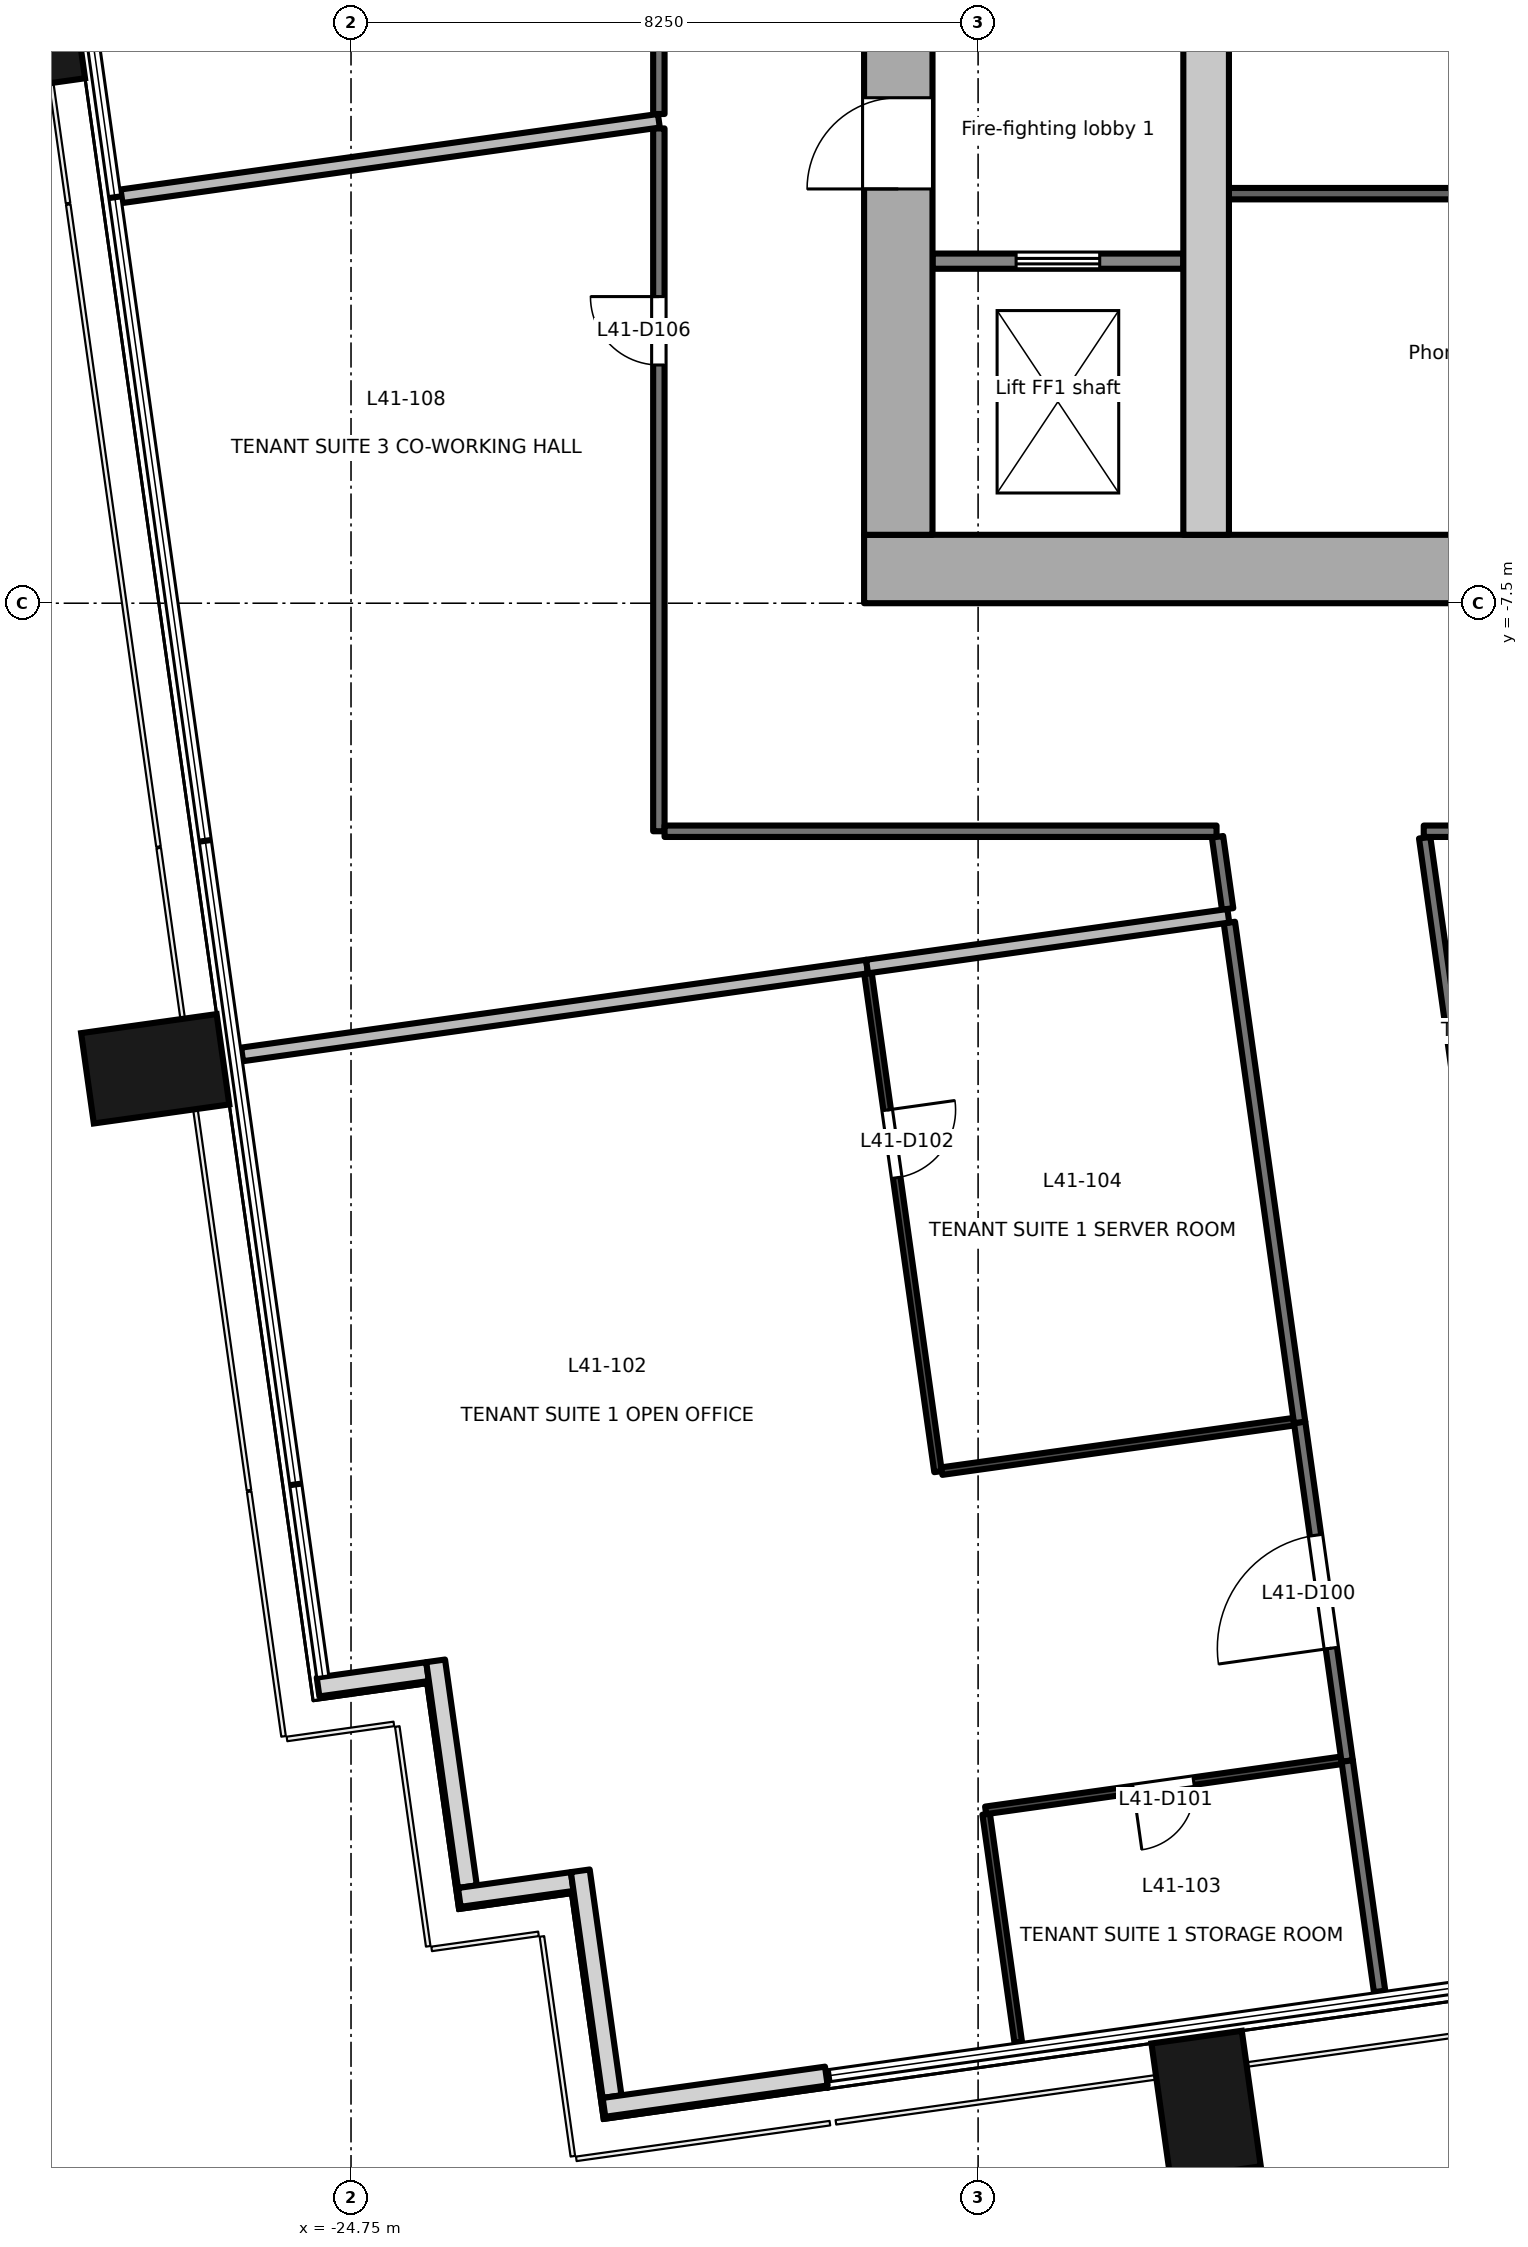
"""IFC4 building model, lengths in metres.
Left out: names, types, materials, properties, quantities, classifications, styles, units other than length and angle.
Written with IfcOpenShell. Run it as: python <this file> out.ifc"""

import sys

from ifc_helpers import new_model, si_unit, direction, frame, frame_2d, origin, origin_2d, place, context, subcontext, project, spatial, rectangle, extrude, element, fill, save


model = new_model("IFC4")
c1 = context("Model", 3, precision=1e-05, world=origin(), true_north=direction((0.0, 1.0)))
c2 = subcontext(c1, "Body", "Model", "MODEL_VIEW")
j1 = project(units=[si_unit("LENGTHUNIT", "METRE"), si_unit("PLANEANGLEUNIT", "RADIAN")], contexts=[c1])
p1 = place(None, origin())
s1 = spatial("IfcSite", under=j1, at=p1, CompositionType="ELEMENT")
p2 = place(p1, origin())
s2 = spatial("IfcBuilding", under=s1, at=p2, CompositionType="ELEMENT")
p3 = place(p2, frame((0.0, 0.0, 180.2)))
s3 = spatial("IfcBuildingStorey", under=s2, at=p3, CompositionType="ELEMENT", Elevation=180.2)
for number, where, z_axis, x_axis in (
    (1, (-13.5, -27.256, -0.2), (0.0, 0.0, 1.0), (0.99, 0.139, 0.0)),
    (2, (-27.326, -13.625, -0.2), (0.0, 0.0, 1.0), (-0.139, 0.99, 0.0)),
    (3, (-29.224, -0.125, -0.2), (0.0, 0.0, 1.0), (-0.139, 0.99, 0.0)),
):
    element("IfcColumn", number, at=place(p3, frame(where, z_axis=z_axis, x_axis=x_axis)), inside=s3, PredefinedType="COLUMN", context=c2, shape_type="SweptSolid", body=[
        extrude(rectangle(XDim=1.2, YDim=1.8, at=origin_2d()), origin(), (0.0, 0.0, 1.0), 3.9),
    ])
p4 = place(p3, frame((-25.184, -21.758, 0.0), z_axis=(0.0, 0.0, 1.0), x_axis=(0.9902493448, 0.13930626376, 0.0)))
e4 = element("IfcWall", 4, at=p4, inside=s3, PredefinedType="SOLIDWALL", context=c2, shape_type="SweptSolid", body=[
    extrude(rectangle(XDim=1.455, YDim=0.25, at=frame_2d((0.727, 0.0))), origin(), (0.0, 0.0, 1.0), 3.7),
])
p5 = place(p3, frame((-23.637, -21.414, 0.0), z_axis=(0.0, 0.0, 1.0), x_axis=(0.139313431826, -0.990248336385, 0.0)))
e5 = element("IfcWall", 5, at=p5, inside=s3, PredefinedType="SOLIDWALL", context=c2, shape_type="SweptSolid", body=[
    extrude(rectangle(XDim=3.0, YDim=0.25, at=frame_2d((1.5, 0.0))), origin(), (0.0, 0.0, 1.0), 3.7),
])
p6 = place(p3, frame((-23.325, -24.526, 0.0), z_axis=(0.0, 0.0, 1.0), x_axis=(0.990243596651, 0.13934711799, 0.0)))
e6 = element("IfcWall", 6, at=p6, inside=s3, PredefinedType="SOLIDWALL", context=c2, shape_type="SweptSolid", body=[
    extrude(rectangle(XDim=1.5, YDim=0.25, at=frame_2d((0.75, 0.0))), origin(), (0.0, 0.0, 1.0), 3.7),
])
p7 = place(p3, frame((-21.734, -24.176, 0.0), z_axis=(0.0, 0.0, 1.0), x_axis=(0.139313431826, -0.990248336385, 0.0)))
e7 = element("IfcWall", 7, at=p7, inside=s3, PredefinedType="SOLIDWALL", context=c2, shape_type="SweptSolid", body=[
    extrude(rectangle(XDim=3.0, YDim=0.25, at=frame_2d((1.5, 0.0))), origin(), (0.0, 0.0, 1.0), 3.7),
])
p8 = place(p3, frame((-21.422, -27.288, 0.0), z_axis=(0.0, 0.0, 1.0), x_axis=(0.990246427036, 0.139327002919, 0.0)))
e8 = element("IfcWall", 8, at=p8, inside=s3, PredefinedType="SOLIDWALL", context=c2, shape_type="SweptSolid", body=[
    extrude(rectangle(XDim=2.954, YDim=0.25, at=frame_2d((1.477, 0.0))), origin(), (0.0, 0.0, 1.0), 3.7),
])
p9 = place(p3, frame((-18.0, -7.05, -0.2), z_axis=(0.0, 0.0, 1.0), x_axis=(1.0, 0.0, 0.0)))
e9 = element("IfcWall", 9, at=p9, inside=s3, PredefinedType="SHEAR", context=c2, shape_type="SweptSolid", body=[
    extrude(rectangle(XDim=36.0, YDim=0.9, at=frame_2d((18.0, 0.0))), origin(), (0.0, 0.0, 1.0), 3.9),
])
p10 = place(p9, frame((11.3, 0.0, 0.2)))
e10 = element("IfcOpeningElement", 10, at=p10, cuts=e9, PredefinedType="OPENING", context=c2, shape_type="SweptSolid", body=[
    extrude(rectangle(XDim=1.8, YDim=2.1, at=frame_2d((0.9, 1.05))), frame((0.0, 0.46, 0.0), z_axis=(0.0, -1.0, 0.0), x_axis=(1.0, 0.0, 0.0)), (0.0, 0.0, 1.0), 0.921),
])
p11 = place(p9, frame((16.8, 0.0, 0.2)))
e11 = element("IfcOpeningElement", 11, at=p11, cuts=e9, PredefinedType="OPENING", context=c2, shape_type="SweptSolid", body=[
    extrude(rectangle(XDim=2.4, YDim=2.1, at=frame_2d((1.2, 1.05))), frame((0.0, 0.46, 0.0), z_axis=(0.0, -1.0, 0.0), x_axis=(1.0, 0.0, 0.0)), (0.0, 0.0, 1.0), 0.921),
])
p12 = place(p9, frame((26.1, 0.0, 0.2)))
e12 = element("IfcOpeningElement", 12, at=p12, cuts=e9, PredefinedType="OPENING", context=c2, shape_type="SweptSolid", body=[
    extrude(rectangle(XDim=2.4, YDim=2.1, at=frame_2d((1.2, 1.05))), frame((0.0, 0.46, 0.0), z_axis=(0.0, -1.0, 0.0), x_axis=(1.0, 0.0, 0.0)), (0.0, 0.0, 1.0), 0.921),
])
p13 = place(p3, frame((-17.55, -6.6, -0.2), z_axis=(0.0, 0.0, 1.0), x_axis=(0.0, 1.0, 0.0)))
e13 = element("IfcWall", 13, at=p13, inside=s3, PredefinedType="SHEAR", context=c2, shape_type="SweptSolid", body=[
    extrude(rectangle(XDim=13.2, YDim=0.9, at=frame_2d((6.6, 0.0))), origin(), (0.0, 0.0, 1.0), 3.9),
])
p14 = place(p13, frame((4.55, 0.0, 0.2)))
e14 = element("IfcOpeningElement", 14, at=p14, cuts=e13, PredefinedType="OPENING", context=c2, shape_type="SweptSolid", body=[
    extrude(rectangle(XDim=1.2, YDim=2.1, at=frame_2d((0.6, 1.05))), frame((0.0, 0.46, 0.0), z_axis=(0.0, -1.0, 0.0), x_axis=(1.0, 0.0, 0.0)), (0.0, 0.0, 1.0), 0.921),
])
p15 = place(p3, frame((-13.5, -6.6, -0.2), z_axis=(0.0, 0.0, 1.0), x_axis=(0.0, 1.0, 0.0)))
e15 = element("IfcWall", 15, at=p15, inside=s3, PredefinedType="SHEAR", context=c2, shape_type="SweptSolid", body=[
    extrude(rectangle(XDim=13.2, YDim=0.6, at=frame_2d((6.6, 0.0))), origin(), (0.0, 0.0, 1.0), 3.9),
])
p16 = place(p3, frame((-17.1, -3.0, 0.0), z_axis=(0.0, 0.0, 1.0), x_axis=(1.0, 0.0, 0.0)))
e16 = element("IfcWall", 16, at=p16, inside=s3, PredefinedType="PARTITIONING", context=c2, shape_type="SweptSolid", body=[
    extrude(rectangle(XDim=3.3, YDim=0.2, at=frame_2d((1.65, 0.0))), origin(), (0.0, 0.0, 1.0), 3.7),
])
p17 = place(p16, frame((1.1, 0.0, 0.0)))
e17 = element("IfcOpeningElement", 17, at=p17, cuts=e16, PredefinedType="OPENING", context=c2, shape_type="SweptSolid", body=[
    extrude(rectangle(XDim=1.1, YDim=2.1, at=frame_2d((0.55, 1.05))), frame((0.0, 0.111, 0.0), z_axis=(0.0, -1.0, 0.0), x_axis=(1.0, 0.0, 0.0)), (0.0, 0.0, 1.0), 0.221),
])
p18 = place(p3, frame((-13.2, -2.112, 0.0), z_axis=(0.0, 0.0, 1.0), x_axis=(1.0, 0.0, 0.0)))
e18 = element("IfcWall", 18, at=p18, inside=s3, PredefinedType="PARTITIONING", context=c2, shape_type="SweptSolid", body=[
    extrude(rectangle(XDim=6.25, YDim=0.15, at=frame_2d((3.125, 0.0))), origin(), (0.0, 0.0, 1.0), 3.7),
])
p19 = place(p3, frame((-11.644, -22.733, 0.0), z_axis=(0.0, 0.0, 1.0), x_axis=(-0.139081954514, 0.990280874262, 0.0)))
e19 = element("IfcWall", 19, at=p19, inside=s3, PredefinedType="PARTITIONING", context=c2, shape_type="SweptSolid", body=[
    extrude(rectangle(XDim=4.501, YDim=0.15, at=frame_2d((2.25, 0.0))), origin(), (0.0, 0.0, 1.0), 3.7),
])
p20 = place(p19, frame((1.5, 0.0, 0.0)))
e20 = element("IfcOpeningElement", 20, at=p20, cuts=e19, PredefinedType="OPENING", context=c2, shape_type="SweptSolid", body=[
    extrude(rectangle(XDim=1.5, YDim=2.1, at=frame_2d((0.75, 1.05))), frame((0.0, 0.085, 0.0), z_axis=(0.0, -1.0, 0.0), x_axis=(1.0, 0.0, 0.0)), (0.0, 0.0, 1.0), 0.171),
])
p21 = place(p3, frame((-11.218, -25.763, 0.0), z_axis=(0.0, 0.0, 1.0), x_axis=(-0.139187613425, 0.990266029039, 0.0)))
e21 = element("IfcWall", 21, at=p21, inside=s3, PredefinedType="PARTITIONING", context=c2, shape_type="SweptSolid", body=[
    extrude(rectangle(XDim=3.061, YDim=0.15, at=frame_2d((1.53, 0.0))), origin(), (0.0, 0.0, 1.0), 3.7),
])
p22 = place(p3, frame((-12.27, -18.277, 0.0), z_axis=(0.0, 0.0, 1.0), x_axis=(-0.139151184207, 0.990271148693, 0.0)))
e22 = element("IfcWall", 22, at=p22, inside=s3, PredefinedType="PARTITIONING", context=c2, shape_type="SweptSolid", body=[
    extrude(rectangle(XDim=6.641, YDim=0.15, at=frame_2d((3.32, 0.0))), origin(), (0.0, 0.0, 1.0), 3.7),
])
p23 = place(p3, frame((-20.7, -10.5, 0.0), z_axis=(0.0, 0.0, 1.0), x_axis=(0.0, 1.0, 0.0)))
e23 = element("IfcWall", 23, at=p23, inside=s3, PredefinedType="PARTITIONING", context=c2, shape_type="SweptSolid", body=[
    extrude(rectangle(XDim=9.246, YDim=0.15, at=frame_2d((4.623, 0.0))), origin(), (0.0, 0.0, 1.0), 3.25),
])
p24 = place(p23, frame((6.134, 0.0, 0.0)))
e24 = element("IfcOpeningElement", 24, at=p24, cuts=e23, PredefinedType="OPENING", context=c2, shape_type="SweptSolid", body=[
    extrude(rectangle(XDim=0.9, YDim=2.1, at=frame_2d((0.45, 1.05))), frame((0.0, 0.085, 0.0), z_axis=(0.0, -1.0, 0.0), x_axis=(1.0, 0.0, 0.0)), (0.0, 0.0, 1.0), 0.171),
])
p25 = place(p3, frame((-13.363, -10.5, 0.0), z_axis=(0.0, 0.0, 1.0), x_axis=(-1.0, 0.0, 0.0)))
e25 = element("IfcWall", 25, at=p25, inside=s3, PredefinedType="PARTITIONING", context=c2, shape_type="SweptSolid", body=[
    extrude(rectangle(XDim=7.262, YDim=0.15, at=frame_2d((3.631, 0.0))), origin(), (0.0, 0.0, 1.0), 2.8),
])
p26 = place(p3, frame((-13.217, -11.522, 0.0), z_axis=(0.0, 0.0, 1.0), x_axis=(-0.138852741578, 0.990313039476, 0.0)))
e26 = element("IfcWall", 26, at=p26, inside=s3, PredefinedType="PARTITIONING", context=c2, shape_type="SweptSolid", body=[
    extrude(rectangle(XDim=0.958, YDim=0.15, at=frame_2d((0.479, 0.0))), origin(), (0.0, 0.0, 1.0), 2.8),
])
p27 = place(p3, frame((-20.7, -1.064, 0.0), z_axis=(0.0, 0.0, 1.0), x_axis=(0.0, 1.0, 0.0)))
e27 = element("IfcWall", 27, at=p27, inside=s3, PredefinedType="PARTITIONING", context=c2, shape_type="SweptSolid", body=[
    extrude(rectangle(XDim=8.564, YDim=0.15, at=frame_2d((4.282, 0.0))), origin(), (0.0, 0.0, 1.0), 3.2),
])
p28 = place(p27, frame((3.382, 0.0, 0.0)))
e28 = element("IfcOpeningElement", 28, at=p28, cuts=e27, PredefinedType="OPENING", context=c2, shape_type="SweptSolid", body=[
    extrude(rectangle(XDim=1.8, YDim=2.1, at=frame_2d((0.9, 1.05))), frame((0.0, 0.085, 0.0), z_axis=(0.0, -1.0, 0.0), x_axis=(1.0, 0.0, 0.0)), (0.0, 0.0, 1.0), 0.171),
])
p29 = place(p3, frame((-10.625, -10.585, 0.0), z_axis=(0.0, 0.0, 1.0), x_axis=(0.138987741071, -0.990294101685, 0.0)))
e29 = element("IfcWall", 29, at=p29, inside=s3, PredefinedType="PARTITIONING", context=c2, shape_type="SweptSolid", body=[
    extrude(rectangle(XDim=4.734, YDim=0.15, at=frame_2d((2.367, 0.0))), origin(), (0.0, 0.0, 1.0), 3.7),
])
p30 = place(p3, frame((-5.203, -10.5, 0.0), z_axis=(0.0, 0.0, 1.0), x_axis=(-1.0, 0.0, 0.0)))
e30 = element("IfcWall", 30, at=p30, inside=s3, PredefinedType="PARTITIONING", context=c2, shape_type="SweptSolid", body=[
    extrude(rectangle(XDim=5.434, YDim=0.15, at=frame_2d((2.717, 0.0))), origin(), (0.0, 0.0, 1.0), 2.8),
])
p31 = place(p3, frame((-16.394, -23.431, 0.0), z_axis=(0.0, 0.0, 1.0), x_axis=(0.139333854614, -0.990245462983, 0.0)))
e31 = element("IfcWall", 31, at=p31, inside=s3, PredefinedType="PARTITIONING", context=c2, shape_type="SweptSolid", body=[
    extrude(rectangle(XDim=3.03, YDim=0.1, at=frame_2d((1.515, 0.0))), origin(), (0.0, 0.0, 1.0), 3.7),
])
p32 = place(p3, frame((-11.721, -22.723, 0.0), z_axis=(0.0, 0.0, 1.0), x_axis=(-0.990254018594, -0.139273036368, 0.0)))
e32 = element("IfcWall", 32, at=p32, inside=s3, PredefinedType="PARTITIONING", context=c2, shape_type="SweptSolid", body=[
    extrude(rectangle(XDim=4.726, YDim=0.1, at=frame_2d((2.363, 0.0))), origin(), (0.0, 0.0, 1.0), 2.8),
])
p33 = place(p32, frame((1.963, 0.0, 0.0)))
e33 = element("IfcOpeningElement", 33, at=p33, cuts=e32, PredefinedType="OPENING", context=c2, shape_type="SweptSolid", body=[
    extrude(rectangle(XDim=0.8, YDim=2.1, at=frame_2d((0.4, 1.05))), frame((0.0, 0.061, 0.0), z_axis=(0.0, -1.0, 0.0), x_axis=(1.0, 0.0, 0.0)), (0.0, 0.0, 1.0), 0.121),
])
p34 = place(p3, frame((-17.949, -12.369, 0.0), z_axis=(0.0, 0.0, 1.0), x_axis=(0.1392424012, -0.990258326755, 0.0)))
e34 = element("IfcWall", 34, at=p34, inside=s3, PredefinedType="PARTITIONING", context=c2, shape_type="SweptSolid", body=[
    extrude(rectangle(XDim=6.621, YDim=0.1, at=frame_2d((3.31, 0.0))), origin(), (0.0, 0.0, 1.0), 3.7),
])
p35 = place(p34, frame((1.816, 0.0, 0.0)))
e35 = element("IfcOpeningElement", 35, at=p35, cuts=e34, PredefinedType="OPENING", context=c2, shape_type="SweptSolid", body=[
    extrude(rectangle(XDim=0.9, YDim=2.1, at=frame_2d((0.45, 1.05))), frame((0.0, 0.061, 0.0), z_axis=(0.0, -1.0, 0.0), x_axis=(1.0, 0.0, 0.0)), (0.0, 0.0, 1.0), 0.121),
])
p36 = place(p3, frame((-16.977, -18.918, 0.0), z_axis=(0.0, 0.0, 1.0), x_axis=(0.990292211818, 0.139001205793, 0.0)))
e36 = element("IfcWall", 36, at=p36, inside=s3, PredefinedType="PARTITIONING", context=c2, shape_type="SweptSolid", body=[
    extrude(rectangle(XDim=4.676, YDim=0.1, at=frame_2d((2.338, 0.0))), origin(), (0.0, 0.0, 1.0), 2.8),
])
p37 = place(p3, frame((-26.183, -13.436, 0.0), z_axis=(0.0, 0.0, 1.0), x_axis=(0.990260506457, 0.139226898809, 0.0)))
e37 = element("IfcWall", 37, at=p37, inside=s3, PredefinedType="PARTITIONING", context=c2, shape_type="SweptSolid", body=[
    extrude(rectangle(XDim=8.303, YDim=0.18, at=frame_2d((4.151, 0.0))), origin(), (0.0, 0.0, 1.0), 3.7),
])
p38 = place(p3, frame((-17.961, -12.28, 0.0), z_axis=(0.0, 0.0, 1.0), x_axis=(0.990268412035, 0.139170658277, 0.0)))
e38 = element("IfcWall", 38, at=p38, inside=s3, PredefinedType="PARTITIONING", context=c2, shape_type="SweptSolid", body=[
    extrude(rectangle(XDim=4.8, YDim=0.18, at=frame_2d((2.4, 0.0))), origin(), (0.0, 0.0, 1.0), 2.8),
])
p39 = place(p3, frame((-27.769, -2.146, 0.0), z_axis=(0.0, 0.0, 1.0), x_axis=(0.990279188786, 0.139093954785, 0.0)))
e39 = element("IfcWall", 39, at=p39, inside=s3, PredefinedType="PARTITIONING", context=c2, shape_type="SweptSolid", body=[
    extrude(rectangle(XDim=7.138, YDim=0.18, at=frame_2d((3.569, 0.0))), origin(), (0.0, 0.0, 1.0), 3.7),
])
p40 = place(p17, origin())
e40 = element("IfcDoor", 40, at=p40, inside=s3, OperationType="DOUBLE_DOOR_SLIDING", PredefinedType="DOOR", context=c2, shape_type="SweptSolid", body=[
    extrude(rectangle(XDim=1.1, YDim=2.1, at=frame_2d((0.55, 1.05))), frame((0.0, 0.025, 0.0), z_axis=(0.0, -1.0, 0.0), x_axis=(1.0, 0.0, 0.0)), (0.0, 0.0, 1.0), 0.05),
])
fill(e17, e40)
p41 = place(p14, origin())
e41 = element("IfcDoor", 41, at=p41, inside=s3, OperationType="SINGLE_SWING_LEFT", PredefinedType="DOOR", context=c2, shape_type="SweptSolid", body=[
    extrude(rectangle(XDim=1.2, YDim=2.1, at=frame_2d((0.6, 1.05))), frame((0.0, 0.025, 0.0), z_axis=(0.0, -1.0, 0.0), x_axis=(1.0, 0.0, 0.0)), (0.0, 0.0, 1.0), 0.05),
])
fill(e14, e41)
p42 = place(p20, origin())
e42 = element("IfcDoor", 42, at=p42, inside=s3, OperationType="DOUBLE_DOOR_SINGLE_SWING", PredefinedType="DOOR", context=c2, shape_type="SweptSolid", body=[
    extrude(rectangle(XDim=1.5, YDim=2.1, at=frame_2d((0.75, 1.05))), frame((0.0, 0.025, 0.0), z_axis=(0.0, -1.0, 0.0), x_axis=(1.0, 0.0, 0.0)), (0.0, 0.0, 1.0), 0.05),
])
fill(e20, e42)
p43 = place(p33, origin())
e43 = element("IfcDoor", 43, at=p43, inside=s3, OperationType="SINGLE_SWING_RIGHT", PredefinedType="DOOR", context=c2, shape_type="SweptSolid", body=[
    extrude(rectangle(XDim=0.8, YDim=2.1, at=frame_2d((0.4, 1.05))), frame((0.0, 0.025, 0.0), z_axis=(0.0, -1.0, 0.0), x_axis=(1.0, 0.0, 0.0)), (0.0, 0.0, 1.0), 0.05),
])
fill(e33, e43)
p44 = place(p35, origin())
e44 = element("IfcDoor", 44, at=p44, inside=s3, OperationType="SINGLE_SWING_LEFT", PredefinedType="DOOR", context=c2, shape_type="SweptSolid", body=[
    extrude(rectangle(XDim=0.9, YDim=2.1, at=frame_2d((0.45, 1.05))), frame((0.0, 0.025, 0.0), z_axis=(0.0, -1.0, 0.0), x_axis=(1.0, 0.0, 0.0)), (0.0, 0.0, 1.0), 0.05),
])
fill(e35, e44)
p45 = place(p24, origin())
e45 = element("IfcDoor", 45, at=p45, inside=s3, OperationType="SINGLE_SWING_RIGHT", PredefinedType="DOOR", context=c2, shape_type="SweptSolid", body=[
    extrude(rectangle(XDim=0.9, YDim=2.1, at=frame_2d((0.45, 1.05))), frame((0.0, 0.025, 0.0), z_axis=(0.0, -1.0, 0.0), x_axis=(1.0, 0.0, 0.0)), (0.0, 0.0, 1.0), 0.05),
])
fill(e24, e45)
save(model, sys.argv[1])
